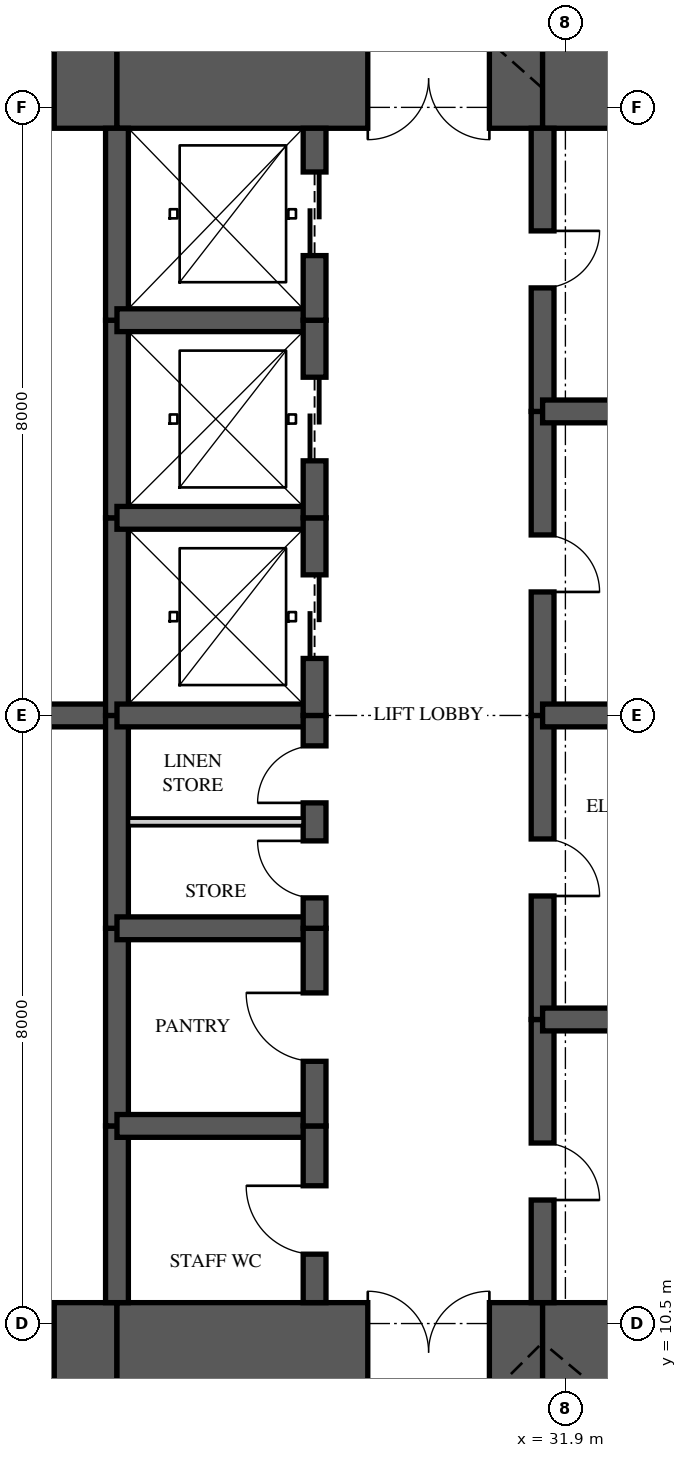
"""IFC4 building model, lengths in metres.
Left out: names, types, materials, properties, quantities, classifications, styles, units other than length and angle.
Written with IfcOpenShell. Run it as: python <this file> out.ifc"""

import sys

from ifc_helpers import new_model, si_unit, direction, frame, frame_2d, origin, place, context, subcontext, project, spatial, rectangle, extrude, element, fill, save


model = new_model("IFC4")
c1 = context("Model", 3, precision=1e-05, world=origin(), true_north=direction((0.0, 1.0)))
c2 = subcontext(c1, "Body", "Model", "MODEL_VIEW")
j1 = project(units=[si_unit("LENGTHUNIT", "METRE"), si_unit("PLANEANGLEUNIT", "RADIAN")], contexts=[c1])
p1 = place(None, origin())
s1 = spatial("IfcSite", under=j1, at=p1, CompositionType="ELEMENT")
p2 = place(p1, origin())
s2 = spatial("IfcBuilding", under=s1, at=p2, CompositionType="ELEMENT")
p3 = place(p2, frame((0.0, 0.0, 204.6)))
s3 = spatial("IfcBuildingStorey", under=s2, at=p3, CompositionType="ELEMENT", Elevation=204.6)
p4 = place(p3, frame((19.65, 10.125, 0.0), z_axis=(0.0, 0.0, 1.0), x_axis=(1.0, 0.0, 0.0)))
e1 = element("IfcWall", 1, at=p4, inside=s3, PredefinedType="SHEAR", context=c2, shape_type="SweptSolid", body=[
    extrude(rectangle(XDim=6.35, YDim=1.3, at=frame_2d((3.175, 0.0))), origin(), (0.0, 0.0, 1.0), 3.35),
])
p5 = place(p4, frame((4.775, 0.0, 0.0)))
e2 = element("IfcOpeningElement", 2, at=p5, cuts=e1, PredefinedType="OPENING", context=c2, shape_type="SweptSolid", body=[
    extrude(rectangle(XDim=0.75, YDim=2.1, at=frame_2d((0.375, 1.05))), frame((0.0, 0.66, 0.0), z_axis=(0.0, -1.0, 0.0), x_axis=(1.0, 0.0, 0.0)), (0.0, 0.0, 1.0), 1.32),
])
p6 = place(p3, frame((26.0, 10.125, 0.0), z_axis=(0.0, 0.0, 1.0), x_axis=(1.0, 0.0, 0.0)))
e3 = element("IfcWall", 3, at=p6, inside=s3, PredefinedType="SHEAR", context=c2, shape_type="SweptSolid", body=[
    extrude(rectangle(XDim=5.6, YDim=1.3, at=frame_2d((2.8, 0.0))), origin(), (0.0, 0.0, 1.0), 3.35),
])
p7 = place(p6, frame((3.3, 0.0, 0.0)))
e4 = element("IfcOpeningElement", 4, at=p7, cuts=e3, PredefinedType="OPENING", context=c2, shape_type="SweptSolid", body=[
    extrude(rectangle(XDim=1.6, YDim=2.1, at=frame_2d((0.8, 1.05))), frame((0.0, 0.66, 0.0), z_axis=(0.0, -1.0, 0.0), x_axis=(1.0, 0.0, 0.0)), (0.0, 0.0, 1.0), 1.32),
])
for number, where, z_axis, x_axis in (
    (5, (31.6, 10.125, 0.0), (0.0, 0.0, 1.0), (1.0, 0.0, 0.0)),
    (6, (35.9, 26.875, 0.0), (0.0, 0.0, 1.0), (-1.0, 0.0, 0.0)),
):
    element("IfcWall", number, at=place(p3, frame(where, z_axis=z_axis, x_axis=x_axis)), inside=s3, PredefinedType="SHEAR", context=c2, shape_type="SweptSolid", body=[
        extrude(rectangle(XDim=4.3, YDim=1.3, at=frame_2d((2.15, 0.0))), origin(), (0.0, 0.0, 1.0), 3.35),
    ])
p8 = place(p3, frame((31.6, 26.875, 0.0), z_axis=(0.0, 0.0, 1.0), x_axis=(-1.0, 0.0, 0.0)))
e7 = element("IfcWall", 7, at=p8, inside=s3, PredefinedType="SHEAR", context=c2, shape_type="SweptSolid", body=[
    extrude(rectangle(XDim=5.6, YDim=1.3, at=frame_2d((2.8, 0.0))), origin(), (0.0, 0.0, 1.0), 3.35),
])
p9 = place(p8, frame((0.7, 0.0, 0.0)))
e8 = element("IfcOpeningElement", 8, at=p9, cuts=e7, PredefinedType="OPENING", context=c2, shape_type="SweptSolid", body=[
    extrude(rectangle(XDim=1.6, YDim=2.1, at=frame_2d((0.8, 1.05))), frame((0.0, 0.66, 0.0), z_axis=(0.0, -1.0, 0.0), x_axis=(1.0, 0.0, 0.0)), (0.0, 0.0, 1.0), 1.32),
])
p10 = place(p3, frame((26.0, 26.875, 0.0), z_axis=(0.0, 0.0, 1.0), x_axis=(-1.0, 0.0, 0.0)))
e9 = element("IfcWall", 9, at=p10, inside=s3, PredefinedType="SHEAR", context=c2, shape_type="SweptSolid", body=[
    extrude(rectangle(XDim=6.35, YDim=1.3, at=frame_2d((3.175, 0.0))), origin(), (0.0, 0.0, 1.0), 3.35),
])
p11 = place(p10, frame((0.825, 0.0, 0.0)))
e10 = element("IfcOpeningElement", 10, at=p11, cuts=e9, PredefinedType="OPENING", context=c2, shape_type="SweptSolid", body=[
    extrude(rectangle(XDim=0.75, YDim=2.1, at=frame_2d((0.375, 1.05))), frame((0.0, 0.66, 0.0), z_axis=(0.0, -1.0, 0.0), x_axis=(1.0, 0.0, 0.0)), (0.0, 0.0, 1.0), 1.32),
])
p12 = place(p3, frame((26.0, 10.775, 0.0), z_axis=(0.0, 0.0, 1.0), x_axis=(0.0, 1.0, 0.0)))
e11 = element("IfcWall", 11, at=p12, inside=s3, PredefinedType="SHEAR", context=c2, shape_type="SweptSolid", body=[
    extrude(rectangle(XDim=2.325, YDim=0.3, at=frame_2d((1.163, 0.0))), origin(), (0.0, 0.0, 1.0), 3.35),
])
p13 = place(p3, frame((26.0, 13.1, 0.0), z_axis=(0.0, 0.0, 1.0), x_axis=(0.0, 1.0, 0.0)))
e12 = element("IfcWall", 12, at=p13, inside=s3, PredefinedType="SHEAR", context=c2, shape_type="SweptSolid", body=[
    extrude(rectangle(XDim=2.6, YDim=0.3, at=frame_2d((1.3, 0.0))), origin(), (0.0, 0.0, 1.0), 3.35),
])
p14 = place(p3, frame((26.0, 15.7, 0.0), z_axis=(0.0, 0.0, 1.0), x_axis=(0.0, 1.0, 0.0)))
e13 = element("IfcWall", 13, at=p14, inside=s3, PredefinedType="SHEAR", context=c2, shape_type="SweptSolid", body=[
    extrude(rectangle(XDim=2.8, YDim=0.3, at=frame_2d((1.4, 0.0))), origin(), (0.0, 0.0, 1.0), 3.35),
])
p15 = place(p3, frame((26.0, 18.5, 0.0), z_axis=(0.0, 0.0, 1.0), x_axis=(0.0, 1.0, 0.0)))
e14 = element("IfcWall", 14, at=p15, inside=s3, PredefinedType="SHEAR", context=c2, shape_type="SweptSolid", body=[
    extrude(rectangle(XDim=2.6, YDim=0.3, at=frame_2d((1.3, 0.0))), origin(), (0.0, 0.0, 1.0), 3.35),
])
p16 = place(p3, frame((26.0, 21.1, 0.0), z_axis=(0.0, 0.0, 1.0), x_axis=(0.0, 1.0, 0.0)))
e15 = element("IfcWall", 15, at=p16, inside=s3, PredefinedType="SHEAR", context=c2, shape_type="SweptSolid", body=[
    extrude(rectangle(XDim=2.6, YDim=0.3, at=frame_2d((1.3, 0.0))), origin(), (0.0, 0.0, 1.0), 3.35),
])
p17 = place(p3, frame((26.0, 23.7, 0.0), z_axis=(0.0, 0.0, 1.0), x_axis=(0.0, 1.0, 0.0)))
e16 = element("IfcWall", 16, at=p17, inside=s3, PredefinedType="SHEAR", context=c2, shape_type="SweptSolid", body=[
    extrude(rectangle(XDim=2.525, YDim=0.3, at=frame_2d((1.263, 0.0))), origin(), (0.0, 0.0, 1.0), 3.35),
])
p18 = place(p3, frame((28.6, 10.775, 0.0), z_axis=(0.0, 0.0, 1.0), x_axis=(0.0, 1.0, 0.0)))
e17 = element("IfcWall", 17, at=p18, inside=s3, PredefinedType="SHEAR", context=c2, shape_type="SweptSolid", body=[
    extrude(rectangle(XDim=2.325, YDim=0.3, at=frame_2d((1.163, 0.0))), origin(), (0.0, 0.0, 1.0), 3.35),
])
p19 = place(p18, frame((0.637, 0.0, 0.0)))
e18 = element("IfcOpeningElement", 18, at=p19, cuts=e17, PredefinedType="OPENING", context=c2, shape_type="SweptSolid", body=[
    extrude(rectangle(XDim=0.9, YDim=2.1, at=frame_2d((0.45, 1.05))), frame((0.0, 0.16, 0.0), z_axis=(0.0, -1.0, 0.0), x_axis=(1.0, 0.0, 0.0)), (0.0, 0.0, 1.0), 0.32),
])
p20 = place(p3, frame((28.6, 13.1, 0.0), z_axis=(0.0, 0.0, 1.0), x_axis=(0.0, 1.0, 0.0)))
e19 = element("IfcWall", 19, at=p20, inside=s3, PredefinedType="SHEAR", context=c2, shape_type="SweptSolid", body=[
    extrude(rectangle(XDim=2.6, YDim=0.3, at=frame_2d((1.3, 0.0))), origin(), (0.0, 0.0, 1.0), 3.35),
])
p21 = place(p20, frame((0.85, 0.0, 0.0)))
e20 = element("IfcOpeningElement", 20, at=p21, cuts=e19, PredefinedType="OPENING", context=c2, shape_type="SweptSolid", body=[
    extrude(rectangle(XDim=0.9, YDim=2.1, at=frame_2d((0.45, 1.05))), frame((0.0, 0.16, 0.0), z_axis=(0.0, -1.0, 0.0), x_axis=(1.0, 0.0, 0.0)), (0.0, 0.0, 1.0), 0.32),
])
p22 = place(p3, frame((28.6, 15.7, 0.0), z_axis=(0.0, 0.0, 1.0), x_axis=(0.0, 1.0, 0.0)))
e21 = element("IfcWall", 21, at=p22, inside=s3, PredefinedType="SHEAR", context=c2, shape_type="SweptSolid", body=[
    extrude(rectangle(XDim=2.8, YDim=0.3, at=frame_2d((1.4, 0.0))), origin(), (0.0, 0.0, 1.0), 3.35),
])
p23 = place(p22, frame((0.4, 0.0, 0.0)))
e22 = element("IfcOpeningElement", 22, at=p23, cuts=e21, PredefinedType="OPENING", context=c2, shape_type="SweptSolid", body=[
    extrude(rectangle(XDim=0.75, YDim=2.1, at=frame_2d((0.375, 1.05))), frame((0.0, 0.16, 0.0), z_axis=(0.0, -1.0, 0.0), x_axis=(1.0, 0.0, 0.0)), (0.0, 0.0, 1.0), 0.32),
])
p24 = place(p22, frame((1.65, 0.0, 0.0)))
e23 = element("IfcOpeningElement", 23, at=p24, cuts=e21, PredefinedType="OPENING", context=c2, shape_type="SweptSolid", body=[
    extrude(rectangle(XDim=0.75, YDim=2.1, at=frame_2d((0.375, 1.05))), frame((0.0, 0.16, 0.0), z_axis=(0.0, -1.0, 0.0), x_axis=(1.0, 0.0, 0.0)), (0.0, 0.0, 1.0), 0.32),
])
p25 = place(p3, frame((28.6, 18.5, 0.0), z_axis=(0.0, 0.0, 1.0), x_axis=(0.0, 1.0, 0.0)))
e24 = element("IfcWall", 24, at=p25, inside=s3, PredefinedType="SHEAR", context=c2, shape_type="SweptSolid", body=[
    extrude(rectangle(XDim=2.6, YDim=0.3, at=frame_2d((1.3, 0.0))), origin(), (0.0, 0.0, 1.0), 3.35),
])
p26 = place(p25, frame((0.75, 0.0, 0.0)))
e25 = element("IfcOpeningElement", 25, at=p26, cuts=e24, PredefinedType="OPENING", context=c2, shape_type="SweptSolid", body=[
    extrude(rectangle(XDim=1.1, YDim=2.1, at=frame_2d((0.55, 1.05))), frame((0.0, 0.16, 0.0), z_axis=(0.0, -1.0, 0.0), x_axis=(1.0, 0.0, 0.0)), (0.0, 0.0, 1.0), 0.32),
])
p27 = place(p3, frame((28.6, 21.1, 0.0), z_axis=(0.0, 0.0, 1.0), x_axis=(0.0, 1.0, 0.0)))
e26 = element("IfcWall", 26, at=p27, inside=s3, PredefinedType="SHEAR", context=c2, shape_type="SweptSolid", body=[
    extrude(rectangle(XDim=2.6, YDim=0.3, at=frame_2d((1.3, 0.0))), origin(), (0.0, 0.0, 1.0), 3.35),
])
p28 = place(p27, frame((0.75, 0.0, 0.0)))
e27 = element("IfcOpeningElement", 27, at=p28, cuts=e26, PredefinedType="OPENING", context=c2, shape_type="SweptSolid", body=[
    extrude(rectangle(XDim=1.1, YDim=2.1, at=frame_2d((0.55, 1.05))), frame((0.0, 0.16, 0.0), z_axis=(0.0, -1.0, 0.0), x_axis=(1.0, 0.0, 0.0)), (0.0, 0.0, 1.0), 0.32),
])
p29 = place(p3, frame((28.6, 23.7, 0.0), z_axis=(0.0, 0.0, 1.0), x_axis=(0.0, 1.0, 0.0)))
e28 = element("IfcWall", 28, at=p29, inside=s3, PredefinedType="SHEAR", context=c2, shape_type="SweptSolid", body=[
    extrude(rectangle(XDim=2.525, YDim=0.3, at=frame_2d((1.263, 0.0))), origin(), (0.0, 0.0, 1.0), 3.35),
])
p30 = place(p29, frame((0.85, 0.0, 0.0)))
e29 = element("IfcOpeningElement", 29, at=p30, cuts=e28, PredefinedType="OPENING", context=c2, shape_type="SweptSolid", body=[
    extrude(rectangle(XDim=1.1, YDim=2.1, at=frame_2d((0.55, 1.05))), frame((0.0, 0.16, 0.0), z_axis=(0.0, -1.0, 0.0), x_axis=(1.0, 0.0, 0.0)), (0.0, 0.0, 1.0), 0.32),
])
p31 = place(p3, frame((31.6, 10.775, 0.0), z_axis=(0.0, 0.0, 1.0), x_axis=(0.0, 1.0, 0.0)))
e30 = element("IfcWall", 30, at=p31, inside=s3, PredefinedType="SHEAR", context=c2, shape_type="SweptSolid", body=[
    extrude(rectangle(XDim=3.725, YDim=0.3, at=frame_2d((1.863, 0.0))), origin(), (0.0, 0.0, 1.0), 3.35),
])
p32 = place(p31, frame((1.35, 0.0, 0.0)))
e31 = element("IfcOpeningElement", 31, at=p32, cuts=e30, PredefinedType="OPENING", context=c2, shape_type="SweptSolid", body=[
    extrude(rectangle(XDim=0.75, YDim=2.1, at=frame_2d((0.375, 1.05))), frame((0.0, 0.16, 0.0), z_axis=(0.0, -1.0, 0.0), x_axis=(1.0, 0.0, 0.0)), (0.0, 0.0, 1.0), 0.32),
])
p33 = place(p3, frame((31.6, 14.5, 0.0), z_axis=(0.0, 0.0, 1.0), x_axis=(0.0, 1.0, 0.0)))
e32 = element("IfcWall", 32, at=p33, inside=s3, PredefinedType="SHEAR", context=c2, shape_type="SweptSolid", body=[
    extrude(rectangle(XDim=4.0, YDim=0.3, at=frame_2d((2.0, 0.0))), origin(), (0.0, 0.0, 1.0), 3.35),
])
p34 = place(p33, frame((1.625, 0.0, 0.0)))
e33 = element("IfcOpeningElement", 33, at=p34, cuts=e32, PredefinedType="OPENING", context=c2, shape_type="SweptSolid", body=[
    extrude(rectangle(XDim=0.75, YDim=2.1, at=frame_2d((0.375, 1.05))), frame((0.0, 0.16, 0.0), z_axis=(0.0, -1.0, 0.0), x_axis=(1.0, 0.0, 0.0)), (0.0, 0.0, 1.0), 0.32),
])
p35 = place(p3, frame((31.6, 18.5, 0.0), z_axis=(0.0, 0.0, 1.0), x_axis=(0.0, 1.0, 0.0)))
e34 = element("IfcWall", 34, at=p35, inside=s3, PredefinedType="SHEAR", context=c2, shape_type="SweptSolid", body=[
    extrude(rectangle(XDim=4.0, YDim=0.3, at=frame_2d((2.0, 0.0))), origin(), (0.0, 0.0, 1.0), 3.35),
])
p36 = place(p35, frame((1.625, 0.0, 0.0)))
e35 = element("IfcOpeningElement", 35, at=p36, cuts=e34, PredefinedType="OPENING", context=c2, shape_type="SweptSolid", body=[
    extrude(rectangle(XDim=0.75, YDim=2.1, at=frame_2d((0.375, 1.05))), frame((0.0, 0.16, 0.0), z_axis=(0.0, -1.0, 0.0), x_axis=(1.0, 0.0, 0.0)), (0.0, 0.0, 1.0), 0.32),
])
p37 = place(p3, frame((31.6, 22.5, 0.0), z_axis=(0.0, 0.0, 1.0), x_axis=(0.0, 1.0, 0.0)))
e36 = element("IfcWall", 36, at=p37, inside=s3, PredefinedType="SHEAR", context=c2, shape_type="SweptSolid", body=[
    extrude(rectangle(XDim=3.725, YDim=0.3, at=frame_2d((1.863, 0.0))), origin(), (0.0, 0.0, 1.0), 3.35),
])
p38 = place(p37, frame((1.625, 0.0, 0.0)))
e37 = element("IfcOpeningElement", 37, at=p38, cuts=e36, PredefinedType="OPENING", context=c2, shape_type="SweptSolid", body=[
    extrude(rectangle(XDim=0.75, YDim=2.1, at=frame_2d((0.375, 1.05))), frame((0.0, 0.16, 0.0), z_axis=(0.0, -1.0, 0.0), x_axis=(1.0, 0.0, 0.0)), (0.0, 0.0, 1.0), 0.32),
])
p39 = place(p3, frame((23.6, 18.5, 0.0), z_axis=(0.0, 0.0, 1.0), x_axis=(1.0, 0.0, 0.0)))
e38 = element("IfcWall", 38, at=p39, inside=s3, PredefinedType="SHEAR", context=c2, shape_type="SweptSolid", body=[
    extrude(rectangle(XDim=2.4, YDim=0.3, at=frame_2d((1.2, 0.0))), origin(), (0.0, 0.0, 1.0), 3.35),
])
for number, where, z_axis, x_axis in (
    (39, (26.0, 13.1, 0.0), (0.0, 0.0, 1.0), (1.0, 0.0, 0.0)),
    (40, (26.0, 15.7, 0.0), (0.0, 0.0, 1.0), (1.0, 0.0, 0.0)),
    (41, (26.0, 18.5, 0.0), (0.0, 0.0, 1.0), (1.0, 0.0, 0.0)),
    (42, (26.0, 21.1, 0.0), (0.0, 0.0, 1.0), (1.0, 0.0, 0.0)),
    (43, (26.0, 23.7, 0.0), (0.0, 0.0, 1.0), (1.0, 0.0, 0.0)),
):
    element("IfcWall", number, at=place(p3, frame(where, z_axis=z_axis, x_axis=x_axis)), inside=s3, PredefinedType="SHEAR", context=c2, shape_type="SweptSolid", body=[
        extrude(rectangle(XDim=2.6, YDim=0.3, at=frame_2d((1.3, 0.0))), origin(), (0.0, 0.0, 1.0), 3.35),
    ])
for number, where, z_axis, x_axis in (
    (44, (31.6, 14.5, 0.0), (0.0, 0.0, 1.0), (1.0, 0.0, 0.0)),
    (45, (31.6, 18.5, 0.0), (0.0, 0.0, 1.0), (1.0, 0.0, 0.0)),
    (46, (31.6, 22.5, 0.0), (0.0, 0.0, 1.0), (1.0, 0.0, 0.0)),
):
    element("IfcWall", number, at=place(p3, frame(where, z_axis=z_axis, x_axis=x_axis)), inside=s3, PredefinedType="SHEAR", context=c2, shape_type="SweptSolid", body=[
        extrude(rectangle(XDim=4.3, YDim=0.3, at=frame_2d((2.15, 0.0))), origin(), (0.0, 0.0, 1.0), 3.35),
    ])
p40 = place(p3, frame((26.15, 17.1, 0.0), z_axis=(0.0, 0.0, 1.0), x_axis=(1.0, 0.0, 0.0)))
e47 = element("IfcWall", 47, at=p40, inside=s3, PredefinedType="PARTITIONING", context=c2, shape_type="SweptSolid", body=[
    extrude(rectangle(XDim=2.3, YDim=0.1, at=frame_2d((1.15, 0.0))), origin(), (0.0, 0.0, 1.0), 3.07),
])
p41 = place(p26, origin())
e48 = element("IfcDoor", 48, at=p41, inside=s3, OperationType="SLIDING_TO_LEFT", PredefinedType="DOOR", context=c2, shape_type="SweptSolid", body=[
    extrude(rectangle(XDim=1.1, YDim=2.1, at=frame_2d((0.55, 1.05))), frame((0.0, 0.025, 0.0), z_axis=(0.0, -1.0, 0.0), x_axis=(1.0, 0.0, 0.0)), (0.0, 0.0, 1.0), 0.05),
])
fill(e25, e48)
p42 = place(p28, origin())
e49 = element("IfcDoor", 49, at=p42, inside=s3, OperationType="SLIDING_TO_LEFT", PredefinedType="DOOR", context=c2, shape_type="SweptSolid", body=[
    extrude(rectangle(XDim=1.1, YDim=2.1, at=frame_2d((0.55, 1.05))), frame((0.0, 0.025, 0.0), z_axis=(0.0, -1.0, 0.0), x_axis=(1.0, 0.0, 0.0)), (0.0, 0.0, 1.0), 0.05),
])
fill(e27, e49)
p43 = place(p30, origin())
e50 = element("IfcDoor", 50, at=p43, inside=s3, OperationType="SLIDING_TO_LEFT", PredefinedType="DOOR", context=c2, shape_type="SweptSolid", body=[
    extrude(rectangle(XDim=1.1, YDim=2.1, at=frame_2d((0.55, 1.05))), frame((0.0, 0.025, 0.0), z_axis=(0.0, -1.0, 0.0), x_axis=(1.0, 0.0, 0.0)), (0.0, 0.0, 1.0), 0.05),
])
fill(e29, e50)
p44 = place(p19, origin())
e51 = element("IfcDoor", 51, at=p44, inside=s3, OperationType="SINGLE_SWING_RIGHT", PredefinedType="DOOR", context=c2, shape_type="SweptSolid", body=[
    extrude(rectangle(XDim=0.9, YDim=2.1, at=frame_2d((0.45, 1.05))), frame((0.0, 0.025, 0.0), z_axis=(0.0, -1.0, 0.0), x_axis=(1.0, 0.0, 0.0)), (0.0, 0.0, 1.0), 0.05),
])
fill(e18, e51)
p45 = place(p21, origin())
e52 = element("IfcDoor", 52, at=p45, inside=s3, OperationType="SINGLE_SWING_RIGHT", PredefinedType="DOOR", context=c2, shape_type="SweptSolid", body=[
    extrude(rectangle(XDim=0.9, YDim=2.1, at=frame_2d((0.45, 1.05))), frame((0.0, 0.025, 0.0), z_axis=(0.0, -1.0, 0.0), x_axis=(1.0, 0.0, 0.0)), (0.0, 0.0, 1.0), 0.05),
])
fill(e20, e52)
p46 = place(p23, origin())
e53 = element("IfcDoor", 53, at=p46, inside=s3, OperationType="SINGLE_SWING_RIGHT", PredefinedType="DOOR", context=c2, shape_type="SweptSolid", body=[
    extrude(rectangle(XDim=0.75, YDim=2.1, at=frame_2d((0.375, 1.05))), frame((0.0, 0.025, 0.0), z_axis=(0.0, -1.0, 0.0), x_axis=(1.0, 0.0, 0.0)), (0.0, 0.0, 1.0), 0.05),
])
fill(e22, e53)
p47 = place(p24, origin())
e54 = element("IfcDoor", 54, at=p47, inside=s3, OperationType="SINGLE_SWING_LEFT", PredefinedType="DOOR", context=c2, shape_type="SweptSolid", body=[
    extrude(rectangle(XDim=0.75, YDim=2.1, at=frame_2d((0.375, 1.05))), frame((0.0, 0.025, 0.0), z_axis=(0.0, -1.0, 0.0), x_axis=(1.0, 0.0, 0.0)), (0.0, 0.0, 1.0), 0.05),
])
fill(e23, e54)
p48 = place(p7, origin())
e55 = element("IfcDoor", 55, at=p48, inside=s3, OperationType="DOUBLE_DOOR_SINGLE_SWING", PredefinedType="DOOR", context=c2, shape_type="SweptSolid", body=[
    extrude(rectangle(XDim=1.6, YDim=2.1, at=frame_2d((0.8, 1.05))), frame((0.0, 0.025, 0.0), z_axis=(0.0, -1.0, 0.0), x_axis=(1.0, 0.0, 0.0)), (0.0, 0.0, 1.0), 0.05),
])
fill(e4, e55)
p49 = place(p9, origin())
e56 = element("IfcDoor", 56, at=p49, inside=s3, OperationType="DOUBLE_DOOR_SINGLE_SWING", PredefinedType="DOOR", context=c2, shape_type="SweptSolid", body=[
    extrude(rectangle(XDim=1.6, YDim=2.1, at=frame_2d((0.8, 1.05))), frame((0.0, 0.025, 0.0), z_axis=(0.0, -1.0, 0.0), x_axis=(1.0, 0.0, 0.0)), (0.0, 0.0, 1.0), 0.05),
])
fill(e8, e56)
p50 = place(p32, frame((0.75, 0.0, 0.0), z_axis=(0.0, 0.0, 1.0), x_axis=(-1.0, 0.0, 0.0)))
e57 = element("IfcDoor", 57, at=p50, inside=s3, OperationType="SINGLE_SWING_RIGHT", PredefinedType="DOOR", context=c2, shape_type="SweptSolid", body=[
    extrude(rectangle(XDim=0.75, YDim=2.1, at=frame_2d((0.375, 1.05))), frame((0.0, 0.025, 0.0), z_axis=(0.0, -1.0, 0.0), x_axis=(1.0, 0.0, 0.0)), (0.0, 0.0, 1.0), 0.05),
])
fill(e31, e57)
p51 = place(p34, frame((0.75, 0.0, 0.0), z_axis=(0.0, 0.0, 1.0), x_axis=(-1.0, 0.0, 0.0)))
e58 = element("IfcDoor", 58, at=p51, inside=s3, OperationType="SINGLE_SWING_RIGHT", PredefinedType="DOOR", context=c2, shape_type="SweptSolid", body=[
    extrude(rectangle(XDim=0.75, YDim=2.1, at=frame_2d((0.375, 1.05))), frame((0.0, 0.025, 0.0), z_axis=(0.0, -1.0, 0.0), x_axis=(1.0, 0.0, 0.0)), (0.0, 0.0, 1.0), 0.05),
])
fill(e33, e58)
p52 = place(p36, frame((0.75, 0.0, 0.0), z_axis=(0.0, 0.0, 1.0), x_axis=(-1.0, 0.0, 0.0)))
e59 = element("IfcDoor", 59, at=p52, inside=s3, OperationType="SINGLE_SWING_RIGHT", PredefinedType="DOOR", context=c2, shape_type="SweptSolid", body=[
    extrude(rectangle(XDim=0.75, YDim=2.1, at=frame_2d((0.375, 1.05))), frame((0.0, 0.025, 0.0), z_axis=(0.0, -1.0, 0.0), x_axis=(1.0, 0.0, 0.0)), (0.0, 0.0, 1.0), 0.05),
])
fill(e35, e59)
p53 = place(p38, frame((0.75, 0.0, 0.0), z_axis=(0.0, 0.0, 1.0), x_axis=(-1.0, 0.0, 0.0)))
e60 = element("IfcDoor", 60, at=p53, inside=s3, OperationType="SINGLE_SWING_LEFT", PredefinedType="DOOR", context=c2, shape_type="SweptSolid", body=[
    extrude(rectangle(XDim=0.75, YDim=2.1, at=frame_2d((0.375, 1.05))), frame((0.0, 0.025, 0.0), z_axis=(0.0, -1.0, 0.0), x_axis=(1.0, 0.0, 0.0)), (0.0, 0.0, 1.0), 0.05),
])
fill(e37, e60)
p54 = place(p5, origin())
e61 = element("IfcDoor", 61, at=p54, inside=s3, OperationType="SINGLE_SWING_LEFT", PredefinedType="DOOR", context=c2, shape_type="SweptSolid", body=[
    extrude(rectangle(XDim=0.75, YDim=2.1, at=frame_2d((0.375, 1.05))), frame((0.0, 0.025, 0.0), z_axis=(0.0, -1.0, 0.0), x_axis=(1.0, 0.0, 0.0)), (0.0, 0.0, 1.0), 0.05),
])
fill(e2, e61)
p55 = place(p11, origin())
e62 = element("IfcDoor", 62, at=p55, inside=s3, OperationType="SINGLE_SWING_RIGHT", PredefinedType="DOOR", context=c2, shape_type="SweptSolid", body=[
    extrude(rectangle(XDim=0.75, YDim=2.1, at=frame_2d((0.375, 1.05))), frame((0.0, 0.025, 0.0), z_axis=(0.0, -1.0, 0.0), x_axis=(1.0, 0.0, 0.0)), (0.0, 0.0, 1.0), 0.05),
])
fill(e10, e62)
save(model, sys.argv[1])
